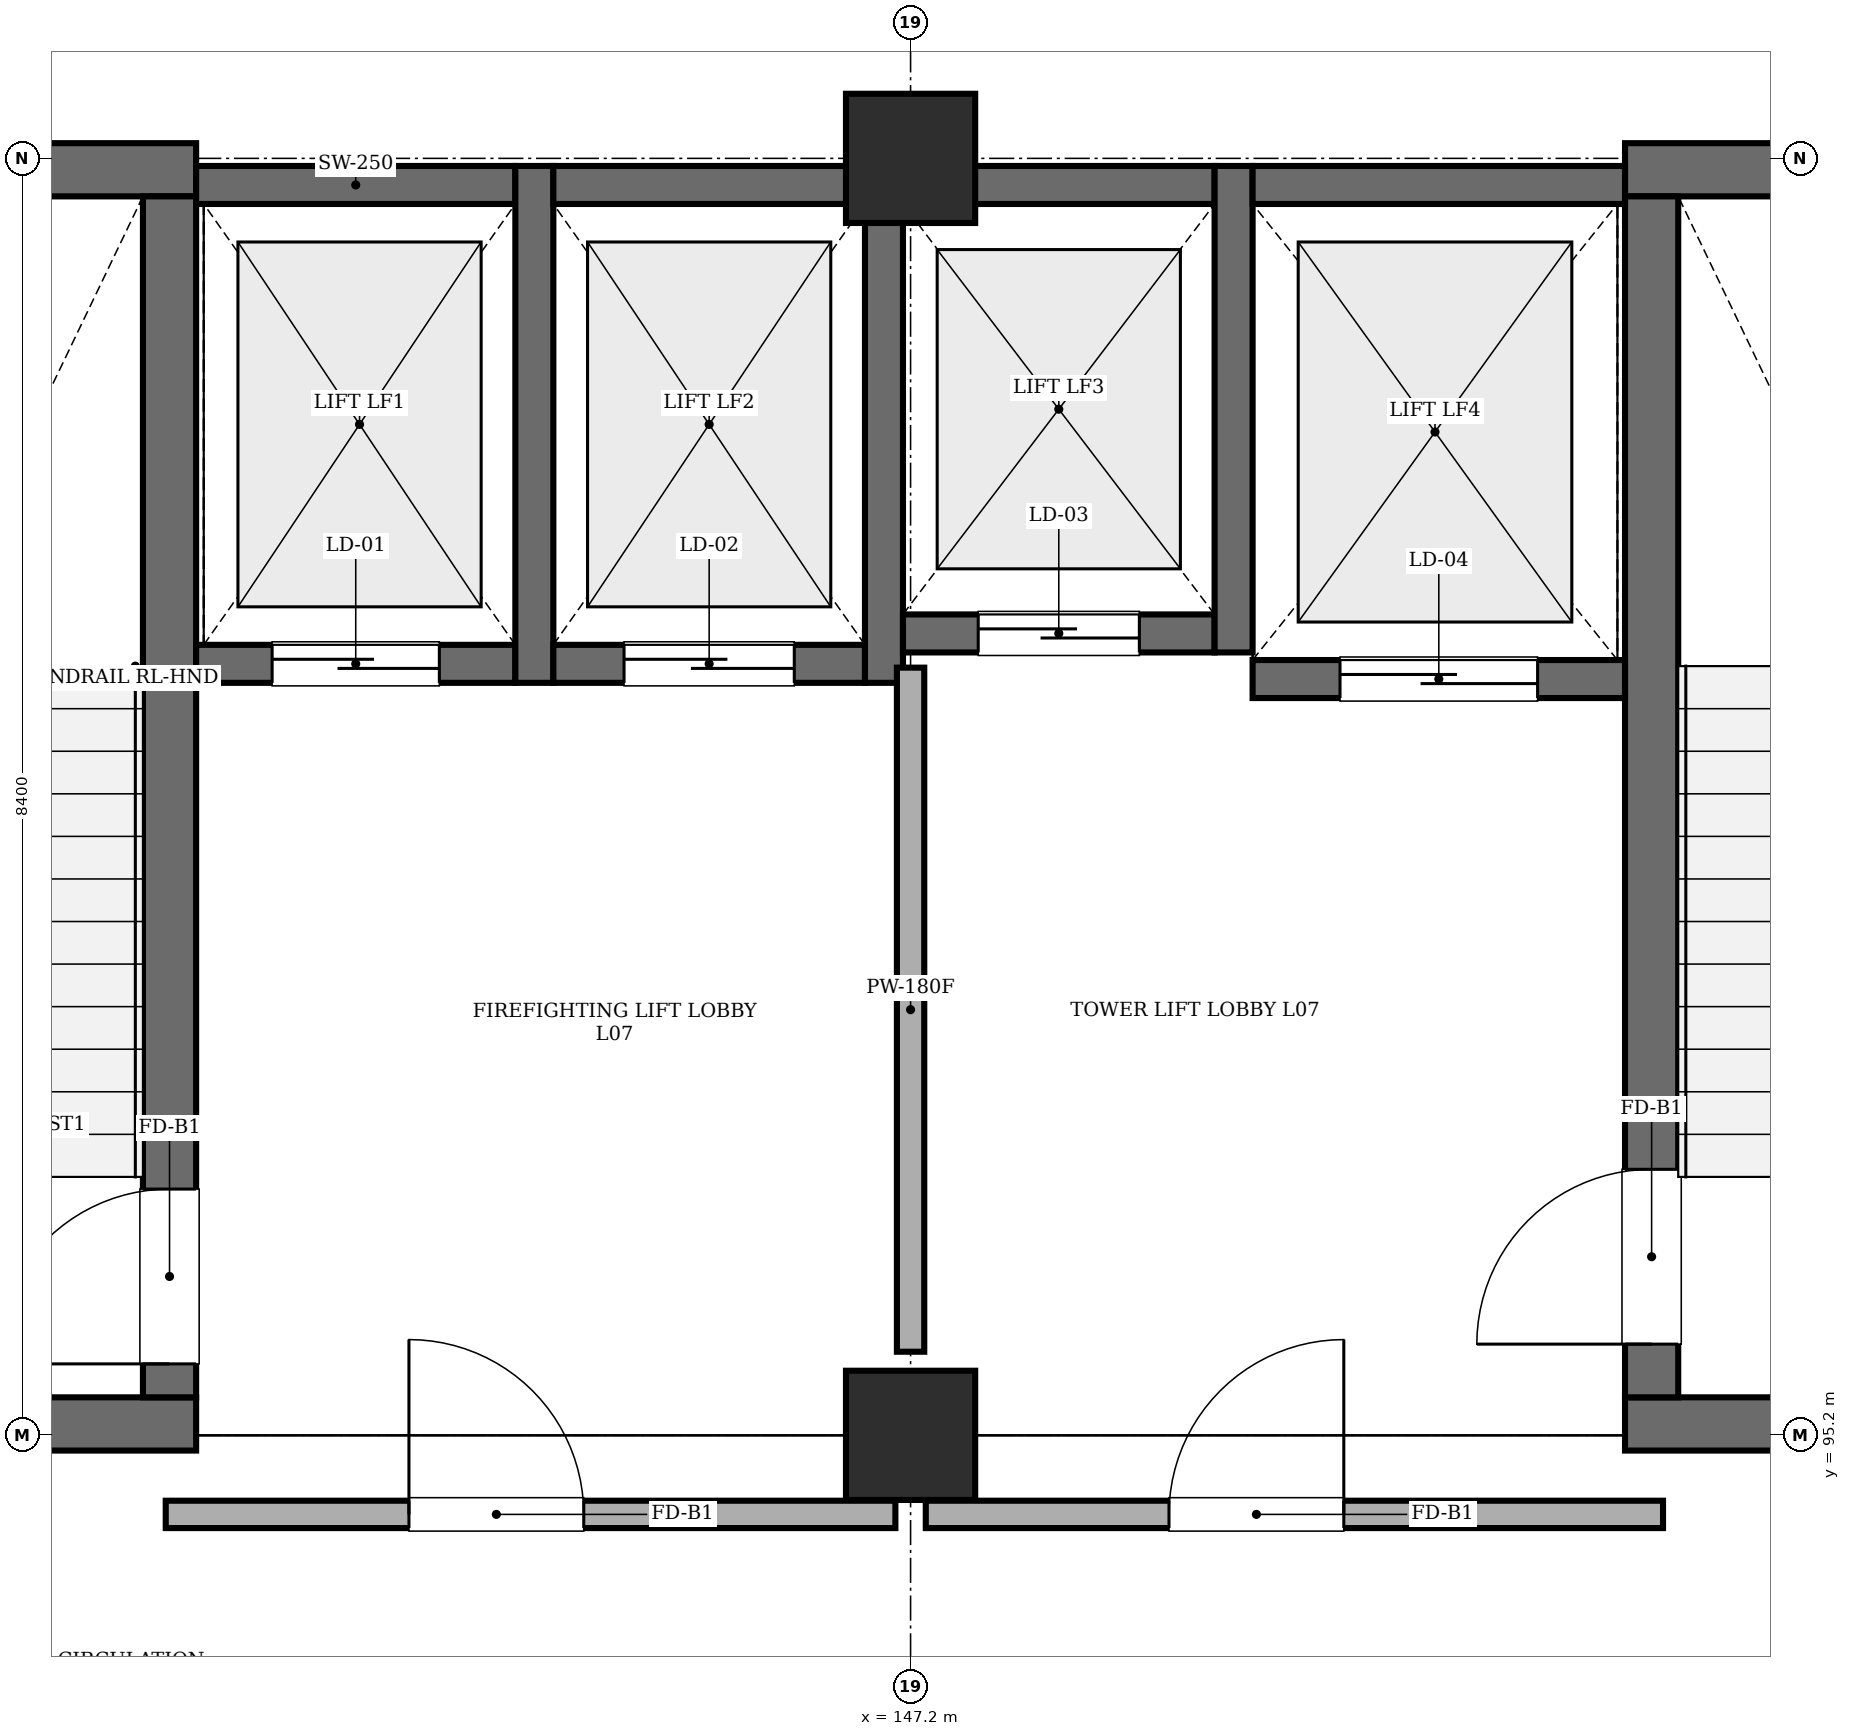
"""IFC4 building model, lengths in metres.
Left out: names, types, materials, properties, quantities, classifications, styles, units other than length and angle.
Written with IfcOpenShell. Run it as: python <this file> out.ifc"""

import sys

from ifc_helpers import new_model, si_unit, direction, frame, frame_2d, origin, origin_2d, place, context, subcontext, project, spatial, rectangle, extrude, element, fill, save


model = new_model("IFC4")
c1 = context("Model", 3, precision=1e-05, world=origin(), true_north=direction((0.0, 1.0)))
c2 = subcontext(c1, "Body", "Model", "MODEL_VIEW")
j1 = project(units=[si_unit("LENGTHUNIT", "METRE"), si_unit("PLANEANGLEUNIT", "RADIAN")], contexts=[c1])
p1 = place(None, origin())
s1 = spatial("IfcSite", under=j1, at=p1, CompositionType="ELEMENT")
p2 = place(p1, origin())
s2 = spatial("IfcBuilding", under=s1, at=p2, CompositionType="ELEMENT")
p3 = place(p2, frame((0.0, 0.0, 27.6)))
s3 = spatial("IfcBuildingStorey", under=s2, at=p3, CompositionType="ELEMENT", Elevation=27.6)
for number, where, z_axis, x_axis in (
    (1, (147.2, 95.2, 0.0), (0.0, 0.0, 1.0), (1.0, 0.0, 0.0)),
    (2, (147.2, 103.6, 0.0), (0.0, 0.0, 1.0), (1.0, 0.0, 0.0)),
):
    element("IfcColumn", number, at=place(p3, frame(where, z_axis=z_axis, x_axis=x_axis)), inside=s3, PredefinedType="COLUMN", context=c2, shape_type="SweptSolid", body=[
        extrude(rectangle(XDim=0.85, YDim=0.85, at=origin_2d()), origin(), (0.0, 0.0, 1.0), 4.02),
    ])
for number, where, z_axis, x_axis in (
    (3, (138.7, 95.275, 0.0), (0.0, 0.0, 1.0), (1.0, 0.0, 0.0)),
    (4, (138.7, 103.525, 0.0), (0.0, 0.0, 1.0), (1.0, 0.0, 0.0)),
):
    element("IfcWall", number, at=place(p3, frame(where, z_axis=z_axis, x_axis=x_axis)), inside=s3, PredefinedType="SHEAR", context=c2, shape_type="SweptSolid", body=[
        extrude(rectangle(XDim=3.8, YDim=0.35, at=frame_2d((1.9, 0.0))), origin(), (0.0, 0.0, 1.0), 4.02),
    ])
p4 = place(p3, frame((142.325, 95.45, 0.0), z_axis=(0.0, 0.0, 1.0), x_axis=(0.0, 1.0, 0.0)))
e5 = element("IfcWall", 5, at=p4, inside=s3, PredefinedType="SHEAR", context=c2, shape_type="SweptSolid", body=[
    extrude(rectangle(XDim=7.9, YDim=0.35, at=frame_2d((3.95, 0.0))), origin(), (0.0, 0.0, 1.0), 4.02),
])
p5 = place(p4, frame((0.22, 0.0, 0.0)))
e6 = element("IfcOpeningElement", 6, at=p5, cuts=e5, PredefinedType="OPENING", context=c2, shape_type="SweptSolid", body=[
    extrude(rectangle(XDim=1.15, YDim=2.15, at=frame_2d((0.575, 1.075))), frame((0.0, 0.185, 0.0), z_axis=(0.0, -1.0, 0.0), x_axis=(1.0, 0.0, 0.0)), (0.0, 0.0, 1.0), 0.37),
])
for number, where, z_axis, x_axis in (
    (7, (151.9, 95.275, 0.0), (0.0, 0.0, 1.0), (1.0, 0.0, 0.0)),
    (8, (151.9, 103.525, 0.0), (0.0, 0.0, 1.0), (1.0, 0.0, 0.0)),
):
    element("IfcWall", number, at=place(p3, frame(where, z_axis=z_axis, x_axis=x_axis)), inside=s3, PredefinedType="SHEAR", context=c2, shape_type="SweptSolid", body=[
        extrude(rectangle(XDim=3.8, YDim=0.35, at=frame_2d((1.9, 0.0))), origin(), (0.0, 0.0, 1.0), 4.02),
    ])
p6 = place(p3, frame((152.075, 95.45, 0.0), z_axis=(0.0, 0.0, 1.0), x_axis=(0.0, 1.0, 0.0)))
e9 = element("IfcWall", 9, at=p6, inside=s3, PredefinedType="SHEAR", context=c2, shape_type="SweptSolid", body=[
    extrude(rectangle(XDim=7.9, YDim=0.35, at=frame_2d((3.95, 0.0))), origin(), (0.0, 0.0, 1.0), 4.02),
])
p7 = place(p6, frame((0.35, 0.0, 0.0)))
e10 = element("IfcOpeningElement", 10, at=p7, cuts=e9, PredefinedType="OPENING", context=c2, shape_type="SweptSolid", body=[
    extrude(rectangle(XDim=1.15, YDim=2.15, at=frame_2d((0.575, 1.075))), frame((0.0, 0.185, 0.0), z_axis=(0.0, -1.0, 0.0), x_axis=(1.0, 0.0, 0.0)), (0.0, 0.0, 1.0), 0.37),
])
p8 = place(p3, frame((142.5, 100.275, 0.0), z_axis=(0.0, 0.0, 1.0), x_axis=(1.0, 0.0, 0.0)))
e11 = element("IfcWall", 11, at=p8, inside=s3, PredefinedType="SHEAR", context=c2, shape_type="SweptSolid", body=[
    extrude(rectangle(XDim=2.1, YDim=0.25, at=frame_2d((1.05, 0.0))), origin(), (0.0, 0.0, 1.0), 4.02),
])
p9 = place(p8, frame((0.5, 0.0, 0.0)))
e12 = element("IfcOpeningElement", 12, at=p9, cuts=e11, PredefinedType="OPENING", context=c2, shape_type="SweptSolid", body=[
    extrude(rectangle(XDim=1.1, YDim=2.15, at=frame_2d((0.55, 1.075))), frame((0.0, 0.135, 0.0), z_axis=(0.0, -1.0, 0.0), x_axis=(1.0, 0.0, 0.0)), (0.0, 0.0, 1.0), 0.27),
])
p10 = place(p3, frame((142.5, 103.425, 0.0), z_axis=(0.0, 0.0, 1.0), x_axis=(1.0, 0.0, 0.0)))
e13 = element("IfcWall", 13, at=p10, inside=s3, PredefinedType="SHEAR", context=c2, shape_type="SweptSolid", body=[
    extrude(rectangle(XDim=2.1, YDim=0.25, at=frame_2d((1.05, 0.0))), origin(), (0.0, 0.0, 1.0), 4.02),
])
p11 = place(p3, frame((144.725, 100.15, 0.0), z_axis=(0.0, 0.0, 1.0), x_axis=(0.0, 1.0, 0.0)))
e14 = element("IfcWall", 14, at=p11, inside=s3, PredefinedType="SHEAR", context=c2, shape_type="SweptSolid", body=[
    extrude(rectangle(XDim=3.4, YDim=0.25, at=frame_2d((1.7, 0.0))), origin(), (0.0, 0.0, 1.0), 4.02),
])
p12 = place(p3, frame((144.85, 100.275, 0.0), z_axis=(0.0, 0.0, 1.0), x_axis=(1.0, 0.0, 0.0)))
e15 = element("IfcWall", 15, at=p12, inside=s3, PredefinedType="SHEAR", context=c2, shape_type="SweptSolid", body=[
    extrude(rectangle(XDim=2.05, YDim=0.25, at=frame_2d((1.025, 0.0))), origin(), (0.0, 0.0, 1.0), 4.02),
])
p13 = place(p12, frame((0.465, 0.0, 0.0)))
e16 = element("IfcOpeningElement", 16, at=p13, cuts=e15, PredefinedType="OPENING", context=c2, shape_type="SweptSolid", body=[
    extrude(rectangle(XDim=1.12, YDim=2.15, at=frame_2d((0.56, 1.075))), frame((0.0, 0.135, 0.0), z_axis=(0.0, -1.0, 0.0), x_axis=(1.0, 0.0, 0.0)), (0.0, 0.0, 1.0), 0.27),
])
p14 = place(p3, frame((144.85, 103.425, 0.0), z_axis=(0.0, 0.0, 1.0), x_axis=(1.0, 0.0, 0.0)))
e17 = element("IfcWall", 17, at=p14, inside=s3, PredefinedType="SHEAR", context=c2, shape_type="SweptSolid", body=[
    extrude(rectangle(XDim=2.05, YDim=0.25, at=frame_2d((1.025, 0.0))), origin(), (0.0, 0.0, 1.0), 4.02),
])
p15 = place(p3, frame((147.025, 100.15, 0.0), z_axis=(0.0, 0.0, 1.0), x_axis=(0.0, 1.0, 0.0)))
e18 = element("IfcWall", 18, at=p15, inside=s3, PredefinedType="SHEAR", context=c2, shape_type="SweptSolid", body=[
    extrude(rectangle(XDim=3.4, YDim=0.25, at=frame_2d((1.7, 0.0))), origin(), (0.0, 0.0, 1.0), 4.02),
])
p16 = place(p3, frame((147.15, 100.475, 0.0), z_axis=(0.0, 0.0, 1.0), x_axis=(1.0, 0.0, 0.0)))
e19 = element("IfcWall", 19, at=p16, inside=s3, PredefinedType="SHEAR", context=c2, shape_type="SweptSolid", body=[
    extrude(rectangle(XDim=2.05, YDim=0.25, at=frame_2d((1.025, 0.0))), origin(), (0.0, 0.0, 1.0), 4.02),
])
p17 = place(p16, frame((0.495, 0.0, 0.0)))
e20 = element("IfcOpeningElement", 20, at=p17, cuts=e19, PredefinedType="OPENING", context=c2, shape_type="SweptSolid", body=[
    extrude(rectangle(XDim=1.06, YDim=2.15, at=frame_2d((0.53, 1.075))), frame((0.0, 0.135, 0.0), z_axis=(0.0, -1.0, 0.0), x_axis=(1.0, 0.0, 0.0)), (0.0, 0.0, 1.0), 0.27),
])
p18 = place(p3, frame((147.15, 103.425, 0.0), z_axis=(0.0, 0.0, 1.0), x_axis=(1.0, 0.0, 0.0)))
e21 = element("IfcWall", 21, at=p18, inside=s3, PredefinedType="SHEAR", context=c2, shape_type="SweptSolid", body=[
    extrude(rectangle(XDim=2.05, YDim=0.25, at=frame_2d((1.025, 0.0))), origin(), (0.0, 0.0, 1.0), 4.02),
])
p19 = place(p3, frame((149.325, 100.35, 0.0), z_axis=(0.0, 0.0, 1.0), x_axis=(0.0, 1.0, 0.0)))
e22 = element("IfcWall", 22, at=p19, inside=s3, PredefinedType="SHEAR", context=c2, shape_type="SweptSolid", body=[
    extrude(rectangle(XDim=3.2, YDim=0.25, at=frame_2d((1.6, 0.0))), origin(), (0.0, 0.0, 1.0), 4.02),
])
p20 = place(p3, frame((149.45, 100.175, 0.0), z_axis=(0.0, 0.0, 1.0), x_axis=(1.0, 0.0, 0.0)))
e23 = element("IfcWall", 23, at=p20, inside=s3, PredefinedType="SHEAR", context=c2, shape_type="SweptSolid", body=[
    extrude(rectangle(XDim=2.45, YDim=0.25, at=frame_2d((1.225, 0.0))), origin(), (0.0, 0.0, 1.0), 4.02),
])
p21 = place(p20, frame((0.575, 0.0, 0.0)))
e24 = element("IfcOpeningElement", 24, at=p21, cuts=e23, PredefinedType="OPENING", context=c2, shape_type="SweptSolid", body=[
    extrude(rectangle(XDim=1.3, YDim=2.25, at=frame_2d((0.65, 1.125))), frame((0.0, 0.135, 0.0), z_axis=(0.0, -1.0, 0.0), x_axis=(1.0, 0.0, 0.0)), (0.0, 0.0, 1.0), 0.27),
])
p22 = place(p3, frame((149.45, 103.425, 0.0), z_axis=(0.0, 0.0, 1.0), x_axis=(1.0, 0.0, 0.0)))
e25 = element("IfcWall", 25, at=p22, inside=s3, PredefinedType="SHEAR", context=c2, shape_type="SweptSolid", body=[
    extrude(rectangle(XDim=2.45, YDim=0.25, at=frame_2d((1.225, 0.0))), origin(), (0.0, 0.0, 1.0), 4.02),
])
p23 = place(p3, frame((142.3, 94.68, 0.0), z_axis=(0.0, 0.0, 1.0), x_axis=(1.0, 0.0, 0.0)))
e26 = element("IfcWall", 26, at=p23, inside=s3, PredefinedType="STANDARD", context=c2, shape_type="SweptSolid", body=[
    extrude(rectangle(XDim=4.8, YDim=0.18, at=frame_2d((2.4, 0.0))), origin(), (0.0, 0.0, 1.0), 4.02),
])
p24 = place(p23, frame((1.6, 0.0, 0.0)))
e27 = element("IfcOpeningElement", 27, at=p24, cuts=e26, PredefinedType="OPENING", context=c2, shape_type="SweptSolid", body=[
    extrude(rectangle(XDim=1.15, YDim=2.15, at=frame_2d((0.575, 1.075))), frame((0.0, 0.1, 0.0), z_axis=(0.0, -1.0, 0.0), x_axis=(1.0, 0.0, 0.0)), (0.0, 0.0, 1.0), 0.2),
])
p25 = place(p3, frame((147.3, 94.68, 0.0), z_axis=(0.0, 0.0, 1.0), x_axis=(1.0, 0.0, 0.0)))
e28 = element("IfcWall", 28, at=p25, inside=s3, PredefinedType="STANDARD", context=c2, shape_type="SweptSolid", body=[
    extrude(rectangle(XDim=4.85, YDim=0.18, at=frame_2d((2.425, 0.0))), origin(), (0.0, 0.0, 1.0), 4.02),
])
p26 = place(p25, frame((1.6, 0.0, 0.0)))
e29 = element("IfcOpeningElement", 29, at=p26, cuts=e28, PredefinedType="OPENING", context=c2, shape_type="SweptSolid", body=[
    extrude(rectangle(XDim=1.15, YDim=2.15, at=frame_2d((0.575, 1.075))), frame((0.0, 0.1, 0.0), z_axis=(0.0, -1.0, 0.0), x_axis=(1.0, 0.0, 0.0)), (0.0, 0.0, 1.0), 0.2),
])
p27 = place(p3, frame((147.2, 95.75, 0.0), z_axis=(0.0, 0.0, 1.0), x_axis=(0.0, 1.0, 0.0)))
e30 = element("IfcWall", 30, at=p27, inside=s3, PredefinedType="STANDARD", context=c2, shape_type="SweptSolid", body=[
    extrude(rectangle(XDim=4.5, YDim=0.18, at=frame_2d((2.25, 0.0))), origin(), (0.0, 0.0, 1.0), 3.32),
])
p28 = place(p24, origin())
e31 = element("IfcDoor", 31, at=p28, inside=s3, OperationType="SINGLE_SWING_LEFT", PredefinedType="DOOR", context=c2, shape_type="SweptSolid", body=[
    extrude(rectangle(XDim=1.15, YDim=2.15, at=frame_2d((0.575, 1.075))), frame((0.0, 0.025, 0.0), z_axis=(0.0, -1.0, 0.0), x_axis=(1.0, 0.0, 0.0)), (0.0, 0.0, 1.0), 0.05),
])
fill(e27, e31)
p29 = place(p26, origin())
e32 = element("IfcDoor", 32, at=p29, inside=s3, OperationType="SINGLE_SWING_RIGHT", PredefinedType="DOOR", context=c2, shape_type="SweptSolid", body=[
    extrude(rectangle(XDim=1.15, YDim=2.15, at=frame_2d((0.575, 1.075))), frame((0.0, 0.025, 0.0), z_axis=(0.0, -1.0, 0.0), x_axis=(1.0, 0.0, 0.0)), (0.0, 0.0, 1.0), 0.05),
])
fill(e29, e32)
p30 = place(p5, origin())
e33 = element("IfcDoor", 33, at=p30, inside=s3, OperationType="SINGLE_SWING_LEFT", PredefinedType="DOOR", context=c2, shape_type="SweptSolid", body=[
    extrude(rectangle(XDim=1.15, YDim=2.15, at=frame_2d((0.575, 1.075))), frame((0.0, 0.025, 0.0), z_axis=(0.0, -1.0, 0.0), x_axis=(1.0, 0.0, 0.0)), (0.0, 0.0, 1.0), 0.05),
])
fill(e6, e33)
p31 = place(p7, origin())
e34 = element("IfcDoor", 34, at=p31, inside=s3, OperationType="SINGLE_SWING_LEFT", PredefinedType="DOOR", context=c2, shape_type="SweptSolid", body=[
    extrude(rectangle(XDim=1.15, YDim=2.15, at=frame_2d((0.575, 1.075))), frame((0.0, 0.025, 0.0), z_axis=(0.0, -1.0, 0.0), x_axis=(1.0, 0.0, 0.0)), (0.0, 0.0, 1.0), 0.05),
])
fill(e10, e34)
p32 = place(p9, origin())
e35 = element("IfcDoor", 35, at=p32, inside=s3, OperationType="SLIDING_TO_LEFT", PredefinedType="DOOR", context=c2, shape_type="SweptSolid", body=[
    extrude(rectangle(XDim=1.1, YDim=2.15, at=frame_2d((0.55, 1.075))), frame((0.0, 0.025, 0.0), z_axis=(0.0, -1.0, 0.0), x_axis=(1.0, 0.0, 0.0)), (0.0, 0.0, 1.0), 0.05),
])
fill(e12, e35)
p33 = place(p13, origin())
e36 = element("IfcDoor", 36, at=p33, inside=s3, OperationType="SLIDING_TO_LEFT", PredefinedType="DOOR", context=c2, shape_type="SweptSolid", body=[
    extrude(rectangle(XDim=1.12, YDim=2.15, at=frame_2d((0.56, 1.075))), frame((0.0, 0.025, 0.0), z_axis=(0.0, -1.0, 0.0), x_axis=(1.0, 0.0, 0.0)), (0.0, 0.0, 1.0), 0.05),
])
fill(e16, e36)
p34 = place(p17, origin())
e37 = element("IfcDoor", 37, at=p34, inside=s3, OperationType="SLIDING_TO_LEFT", PredefinedType="DOOR", context=c2, shape_type="SweptSolid", body=[
    extrude(rectangle(XDim=1.06, YDim=2.15, at=frame_2d((0.53, 1.075))), frame((0.0, 0.025, 0.0), z_axis=(0.0, -1.0, 0.0), x_axis=(1.0, 0.0, 0.0)), (0.0, 0.0, 1.0), 0.05),
])
fill(e20, e37)
p35 = place(p21, origin())
e38 = element("IfcDoor", 38, at=p35, inside=s3, OperationType="SLIDING_TO_LEFT", PredefinedType="DOOR", context=c2, shape_type="SweptSolid", body=[
    extrude(rectangle(XDim=1.3, YDim=2.25, at=frame_2d((0.65, 1.125))), frame((0.0, 0.025, 0.0), z_axis=(0.0, -1.0, 0.0), x_axis=(1.0, 0.0, 0.0)), (0.0, 0.0, 1.0), 0.05),
])
fill(e24, e38)
save(model, sys.argv[1])
